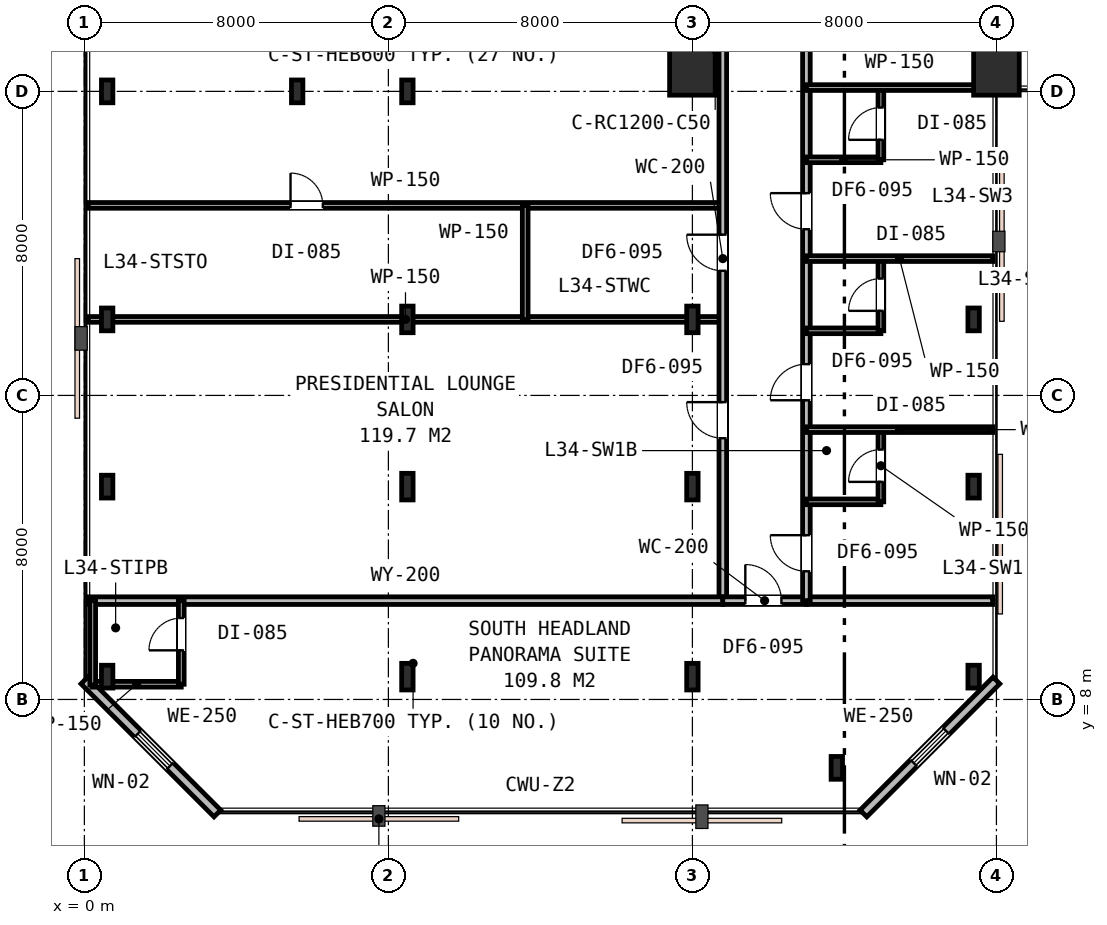
"""IFC4 building model, lengths in metres.
Left out: names, types, materials, properties, quantities, classifications, styles, units other than length and angle.
Written with IfcOpenShell. Run it as: python <this file> out.ifc"""

import sys

from ifc_helpers import new_model, si_unit, direction, frame, frame_2d, origin, origin_2d, place, context, subcontext, project, spatial, rectangle, i_section, extrude, element, fill, save


model = new_model("IFC4")
c1 = context("Model", 3, precision=1e-05, world=origin(), true_north=direction((0.0, 1.0)))
c2 = subcontext(c1, "Body", "Model", "MODEL_VIEW")
j1 = project(units=[si_unit("LENGTHUNIT", "METRE"), si_unit("PLANEANGLEUNIT", "RADIAN")], contexts=[c1])
p1 = place(None, origin())
s1 = spatial("IfcSite", under=j1, at=p1, CompositionType="ELEMENT")
p2 = place(p1, origin())
s2 = spatial("IfcBuilding", under=s1, at=p2, CompositionType="ELEMENT")
p3 = place(p2, frame((0.0, 0.0, 133.2)))
s3 = spatial("IfcBuildingStorey", under=s2, at=p3, CompositionType="ELEMENT", Elevation=133.2)
p4 = place(p3, frame((8.5, 24.0, 0.0), z_axis=(0.0, 0.0, 1.0), x_axis=(1.0, 0.0, 0.0)))
e1 = element("IfcColumn", 1, at=p4, inside=s3, PredefinedType="COLUMN", context=c2, shape_type="SweptSolid", body=[
    extrude(i_section(OverallWidth=0.3, OverallDepth=0.6, WebThickness=0.015, FlangeThickness=0.03, FilletRadius=0.027, at=origin_2d()), origin(), (0.0, 0.0, 1.0), 3.6),
])
for number, where, z_axis, x_axis in (
    (2, (16.0, 24.5, 0.0), (0.0, 0.0, 1.0), (1.0, 0.0, 0.0)),
    (3, (24.0, 24.5, 0.0), (0.0, 0.0, 1.0), (1.0, 0.0, 0.0)),
):
    element("IfcColumn", number, at=place(p3, frame(where, z_axis=z_axis, x_axis=x_axis)), inside=s3, PredefinedType="COLUMN", context=c2, shape_type="SweptSolid", body=[
        extrude(rectangle(XDim=1.2, YDim=1.2, at=origin_2d()), origin(), (0.0, 0.0, 1.0), 3.6),
    ])
for number, where, z_axis, x_axis in (
    (4, (5.6, 24.0, 0.0), (0.0, 0.0, 1.0), (1.0, 0.0, 0.0)),
    (5, (0.6, 24.0, 0.0), (0.0, 0.0, 1.0), (1.0, 0.0, 0.0)),
    (6, (0.6, 8.6, 0.0), (0.0, 0.0, 1.0), (1.0, 0.0, 0.0)),
    (7, (0.6, 13.6, 0.0), (0.0, 0.0, 1.0), (1.0, 0.0, 0.0)),
    (8, (0.6, 18.0, 0.0), (0.0, 0.0, 1.0), (1.0, 0.0, 0.0)),
    (9, (19.8, 6.2, 0.0), (0.0, 0.0, 1.0), (1.0, 0.0, 0.0)),
    (10, (23.4, 8.6, 0.0), (0.0, 0.0, 1.0), (1.0, 0.0, 0.0)),
    (11, (23.4, 13.6, 0.0), (0.0, 0.0, 1.0), (1.0, 0.0, 0.0)),
    (12, (23.4, 18.0, 0.0), (0.0, 0.0, 1.0), (1.0, 0.0, 0.0)),
):
    element("IfcColumn", number, at=place(p3, frame(where, z_axis=z_axis, x_axis=x_axis)), inside=s3, PredefinedType="COLUMN", context=c2, shape_type="SweptSolid", body=[
        extrude(i_section(OverallWidth=0.3, OverallDepth=0.6, WebThickness=0.015, FlangeThickness=0.03, FilletRadius=0.027, at=origin_2d()), origin(), (0.0, 0.0, 1.0), 3.6),
    ])
for number, where, z_axis, x_axis in (
    (13, (8.5, 8.6, 0.0), (0.0, 0.0, 1.0), (1.0, 0.0, 0.0)),
    (14, (16.0, 8.6, 0.0), (0.0, 0.0, 1.0), (1.0, 0.0, 0.0)),
    (15, (8.5, 13.6, 0.0), (0.0, 0.0, 1.0), (1.0, 0.0, 0.0)),
    (16, (16.0, 13.6, 0.0), (0.0, 0.0, 1.0), (1.0, 0.0, 0.0)),
    (17, (8.5, 18.0, 0.0), (0.0, 0.0, 1.0), (1.0, 0.0, 0.0)),
    (18, (16.0, 18.0, 0.0), (0.0, 0.0, 1.0), (1.0, 0.0, 0.0)),
):
    element("IfcColumn", number, at=place(p3, frame(where, z_axis=z_axis, x_axis=x_axis)), inside=s3, PredefinedType="COLUMN", context=c2, shape_type="SweptSolid", body=[
        extrude(i_section(OverallWidth=0.3, OverallDepth=0.7, WebThickness=0.017, FlangeThickness=0.032, FilletRadius=0.027, at=origin_2d()), origin(), (0.0, 0.0, 1.0), 3.6),
    ])
p5 = place(p3, frame((20.5, 5.0, 0.0), z_axis=(0.0, 0.0, 1.0), x_axis=(0.707106781187, 0.707106781187, 0.0)))
e19 = element("IfcWall", 19, at=p5, inside=s3, PredefinedType="STANDARD", context=c2, shape_type="SweptSolid", body=[
    extrude(rectangle(XDim=4.95, YDim=0.25, at=frame_2d((2.475, 0.0))), origin(), (0.0, 0.0, 1.0), 3.33),
])
p6 = place(p5, frame((1.875, 0.0, 0.85)))
e20 = element("IfcOpeningElement", 20, at=p6, cuts=e19, PredefinedType="OPENING", context=c2, shape_type="SweptSolid", body=[
    extrude(rectangle(XDim=1.2, YDim=1.6, at=frame_2d((0.6, 0.8))), frame((0.0, 0.135, 0.0), z_axis=(0.0, -1.0, 0.0), x_axis=(1.0, 0.0, 0.0)), (0.0, 0.0, 1.0), 0.27),
])
p7 = place(p3, frame((0.0, 8.5, 0.0), z_axis=(0.0, 0.0, 1.0), x_axis=(0.707106781187, -0.707106781187, 0.0)))
e21 = element("IfcWall", 21, at=p7, inside=s3, PredefinedType="STANDARD", context=c2, shape_type="SweptSolid", body=[
    extrude(rectangle(XDim=4.95, YDim=0.25, at=frame_2d((2.475, 0.0))), origin(), (0.0, 0.0, 1.0), 3.33),
])
p8 = place(p7, frame((1.985, 0.0, 0.85)))
e22 = element("IfcOpeningElement", 22, at=p8, cuts=e21, PredefinedType="OPENING", context=c2, shape_type="SweptSolid", body=[
    extrude(rectangle(XDim=1.2, YDim=1.6, at=frame_2d((0.6, 0.8))), frame((0.0, 0.135, 0.0), z_axis=(0.0, -1.0, 0.0), x_axis=(1.0, 0.0, 0.0)), (0.0, 0.0, 1.0), 0.27),
])
p9 = place(p3, frame((0.1, 18.0, 0.0), z_axis=(0.0, 0.0, 1.0), x_axis=(1.0, 0.0, 0.0)))
e23 = element("IfcWall", 23, at=p9, inside=s3, PredefinedType="PARTITIONING", context=c2, shape_type="SweptSolid", body=[
    extrude(rectangle(XDim=16.7, YDim=0.15, at=frame_2d((8.35, 0.0))), origin(), (0.0, 0.0, 1.0), 2.93),
])
p10 = place(p3, frame((0.1, 21.0, 0.0), z_axis=(0.0, 0.0, 1.0), x_axis=(1.0, 0.0, 0.0)))
e24 = element("IfcWall", 24, at=p10, inside=s3, PredefinedType="PARTITIONING", context=c2, shape_type="SweptSolid", body=[
    extrude(rectangle(XDim=16.7, YDim=0.15, at=frame_2d((8.35, 0.0))), origin(), (0.0, 0.0, 1.0), 2.93),
])
p11 = place(p10, frame((5.325, 0.0, 0.0)))
e25 = element("IfcOpeningElement", 25, at=p11, cuts=e24, PredefinedType="OPENING", context=c2, shape_type="SweptSolid", body=[
    extrude(rectangle(XDim=0.85, YDim=2.15, at=frame_2d((0.425, 1.075))), frame((0.0, 0.085, 0.0), z_axis=(0.0, -1.0, 0.0), x_axis=(1.0, 0.0, 0.0)), (0.0, 0.0, 1.0), 0.17),
])
p12 = place(p3, frame((11.6, 18.0, 0.0), z_axis=(0.0, 0.0, 1.0), x_axis=(0.0, 1.0, 0.0)))
e26 = element("IfcWall", 26, at=p12, inside=s3, PredefinedType="PARTITIONING", context=c2, shape_type="SweptSolid", body=[
    extrude(rectangle(XDim=3.0, YDim=0.15, at=frame_2d((1.5, 0.0))), origin(), (0.0, 0.0, 1.0), 2.93),
])
p13 = place(p3, frame((16.8, 10.6, 0.0), z_axis=(0.0, 0.0, 1.0), x_axis=(0.0, 1.0, 0.0)))
e27 = element("IfcWall", 27, at=p13, inside=s3, PredefinedType="PARTITIONING", context=c2, shape_type="SweptSolid", body=[
    extrude(rectangle(XDim=18.0, YDim=0.2, at=frame_2d((9.0, 0.0))), origin(), (0.0, 0.0, 1.0), 2.93),
])
p14 = place(p13, frame((8.679, 0.0, 0.0)))
e28 = element("IfcOpeningElement", 28, at=p14, cuts=e27, PredefinedType="OPENING", context=c2, shape_type="SweptSolid", body=[
    extrude(rectangle(XDim=0.95, YDim=2.15, at=frame_2d((0.475, 1.075))), frame((0.0, 0.11, 0.0), z_axis=(0.0, -1.0, 0.0), x_axis=(1.0, 0.0, 0.0)), (0.0, 0.0, 1.0), 0.22),
])
p15 = place(p13, frame((15.399, 0.0, 0.0)))
e29 = element("IfcOpeningElement", 29, at=p15, cuts=e27, PredefinedType="OPENING", context=c2, shape_type="SweptSolid", body=[
    extrude(rectangle(XDim=0.95, YDim=2.15, at=frame_2d((0.475, 1.075))), frame((0.0, 0.11, 0.0), z_axis=(0.0, -1.0, 0.0), x_axis=(1.0, 0.0, 0.0)), (0.0, 0.0, 1.0), 0.22),
])
p16 = place(p13, frame((4.273, 0.0, 0.0)))
e30 = element("IfcOpeningElement", 30, at=p16, cuts=e27, PredefinedType="OPENING", context=c2, shape_type="SweptSolid", body=[
    extrude(rectangle(XDim=0.95, YDim=2.15, at=frame_2d((0.475, 1.075))), frame((0.0, 0.11, 0.0), z_axis=(0.0, -1.0, 0.0), x_axis=(1.0, 0.0, 0.0)), (0.0, 0.0, 1.0), 0.22),
])
p17 = place(p3, frame((0.1, 10.6, 0.0), z_axis=(0.0, 0.0, 1.0), x_axis=(1.0, 0.0, 0.0)))
e31 = element("IfcWall", 31, at=p17, inside=s3, PredefinedType="PARTITIONING", context=c2, shape_type="SweptSolid", body=[
    extrude(rectangle(XDim=16.7, YDim=0.2, at=frame_2d((8.35, 0.0))), origin(), (0.0, 0.0, 1.0), 2.93),
])
p18 = place(p3, frame((19.0, 10.6, 0.0), z_axis=(0.0, 0.0, 1.0), x_axis=(1.0, 0.0, 0.0)))
e32 = element("IfcWall", 32, at=p18, inside=s3, PredefinedType="PARTITIONING", context=c2, shape_type="SweptSolid", body=[
    extrude(rectangle(XDim=4.9, YDim=0.2, at=frame_2d((2.45, 0.0))), origin(), (0.0, 0.0, 1.0), 2.96),
])
p19 = place(p3, frame((16.8, 10.6, 0.0), z_axis=(0.0, 0.0, 1.0), x_axis=(1.0, 0.0, 0.0)))
e33 = element("IfcWall", 33, at=p19, inside=s3, PredefinedType="PARTITIONING", context=c2, shape_type="SweptSolid", body=[
    extrude(rectangle(XDim=2.2, YDim=0.2, at=frame_2d((1.1, 0.0))), origin(), (0.0, 0.0, 1.0), 2.96),
])
p20 = place(p19, frame((0.593, 0.0, 0.0)))
e34 = element("IfcOpeningElement", 34, at=p20, cuts=e33, PredefinedType="OPENING", context=c2, shape_type="SweptSolid", body=[
    extrude(rectangle(XDim=0.95, YDim=2.15, at=frame_2d((0.475, 1.075))), frame((0.0, 0.11, 0.0), z_axis=(0.0, -1.0, 0.0), x_axis=(1.0, 0.0, 0.0)), (0.0, 0.0, 1.0), 0.22),
])
p21 = place(p3, frame((0.2, 8.4, 0.0), z_axis=(0.0, 0.0, 1.0), x_axis=(1.0, 0.0, 0.0)))
e35 = element("IfcWall", 35, at=p21, inside=s3, PredefinedType="PARTITIONING", context=c2, shape_type="SweptSolid", body=[
    extrude(rectangle(XDim=2.35, YDim=0.15, at=frame_2d((1.175, 0.0))), origin(), (0.0, 0.0, 1.0), 2.93),
])
p22 = place(p3, frame((2.55, 8.4, 0.0), z_axis=(0.0, 0.0, 1.0), x_axis=(0.0, 1.0, 0.0)))
e36 = element("IfcWall", 36, at=p22, inside=s3, PredefinedType="PARTITIONING", context=c2, shape_type="SweptSolid", body=[
    extrude(rectangle(XDim=2.2, YDim=0.15, at=frame_2d((1.1, 0.0))), origin(), (0.0, 0.0, 1.0), 2.93),
])
p23 = place(p22, frame((0.892, 0.0, 0.0)))
e37 = element("IfcOpeningElement", 37, at=p23, cuts=e36, PredefinedType="OPENING", context=c2, shape_type="SweptSolid", body=[
    extrude(rectangle(XDim=0.85, YDim=2.15, at=frame_2d((0.425, 1.075))), frame((0.0, 0.085, 0.0), z_axis=(0.0, -1.0, 0.0), x_axis=(1.0, 0.0, 0.0)), (0.0, 0.0, 1.0), 0.17),
])
p24 = place(p3, frame((0.22, 8.38, 0.0), z_axis=(0.0, 0.0, 1.0), x_axis=(0.0, 1.0, 0.0)))
e38 = element("IfcWall", 38, at=p24, inside=s3, PredefinedType="PARTITIONING", context=c2, shape_type="SweptSolid", body=[
    extrude(rectangle(XDim=2.22, YDim=0.15, at=frame_2d((1.11, 0.0))), origin(), (0.0, 0.0, 1.0), 2.93),
])
p25 = place(p3, frame((19.0, 10.6, 0.0), z_axis=(0.0, 0.0, 1.0), x_axis=(0.0, 1.0, 0.0)))
e39 = element("IfcWall", 39, at=p25, inside=s3, PredefinedType="PARTITIONING", context=c2, shape_type="SweptSolid", body=[
    extrude(rectangle(XDim=18.0, YDim=0.2, at=frame_2d((9.0, 0.0))), origin(), (0.0, 0.0, 1.0), 2.93),
])
p26 = place(p25, frame((0.772, 0.0, 0.0)))
e40 = element("IfcOpeningElement", 40, at=p26, cuts=e39, PredefinedType="OPENING", context=c2, shape_type="SweptSolid", body=[
    extrude(rectangle(XDim=0.95, YDim=2.15, at=frame_2d((0.475, 1.075))), frame((0.0, 0.11, 0.0), z_axis=(0.0, -1.0, 0.0), x_axis=(1.0, 0.0, 0.0)), (0.0, 0.0, 1.0), 0.22),
])
p27 = place(p25, frame((5.272, 0.0, 0.0)))
e41 = element("IfcOpeningElement", 41, at=p27, cuts=e39, PredefinedType="OPENING", context=c2, shape_type="SweptSolid", body=[
    extrude(rectangle(XDim=0.95, YDim=2.15, at=frame_2d((0.475, 1.075))), frame((0.0, 0.11, 0.0), z_axis=(0.0, -1.0, 0.0), x_axis=(1.0, 0.0, 0.0)), (0.0, 0.0, 1.0), 0.22),
])
p28 = place(p25, frame((9.773, 0.0, 0.0)))
e42 = element("IfcOpeningElement", 42, at=p28, cuts=e39, PredefinedType="OPENING", context=c2, shape_type="SweptSolid", body=[
    extrude(rectangle(XDim=0.95, YDim=2.15, at=frame_2d((0.475, 1.075))), frame((0.0, 0.11, 0.0), z_axis=(0.0, -1.0, 0.0), x_axis=(1.0, 0.0, 0.0)), (0.0, 0.0, 1.0), 0.22),
])
p29 = place(p25, frame((15.275, 0.0, 0.0)))
e43 = element("IfcOpeningElement", 43, at=p29, cuts=e39, PredefinedType="OPENING", context=c2, shape_type="SweptSolid", body=[
    extrude(rectangle(XDim=0.95, YDim=2.15, at=frame_2d((0.475, 1.075))), frame((0.0, 0.11, 0.0), z_axis=(0.0, -1.0, 0.0), x_axis=(1.0, 0.0, 0.0)), (0.0, 0.0, 1.0), 0.22),
])
p30 = place(p3, frame((19.0, 13.2, 0.0), z_axis=(0.0, 0.0, 1.0), x_axis=(1.0, 0.0, 0.0)))
e44 = element("IfcWall", 44, at=p30, inside=s3, PredefinedType="PARTITIONING", context=c2, shape_type="SweptSolid", body=[
    extrude(rectangle(XDim=1.96, YDim=0.15, at=frame_2d((0.98, 0.0))), origin(), (0.0, 0.0, 1.0), 2.93),
])
p31 = place(p3, frame((20.96, 13.2, 0.0), z_axis=(0.0, 0.0, 1.0), x_axis=(0.0, 1.0, 0.0)))
e45 = element("IfcWall", 45, at=p31, inside=s3, PredefinedType="PARTITIONING", context=c2, shape_type="SweptSolid", body=[
    extrude(rectangle(XDim=1.9, YDim=0.15, at=frame_2d((0.95, 0.0))), origin(), (0.0, 0.0, 1.0), 2.93),
])
p32 = place(p31, frame((0.525, 0.0, 0.0)))
e46 = element("IfcOpeningElement", 46, at=p32, cuts=e45, PredefinedType="OPENING", context=c2, shape_type="SweptSolid", body=[
    extrude(rectangle(XDim=0.85, YDim=2.15, at=frame_2d((0.425, 1.075))), frame((0.0, 0.085, 0.0), z_axis=(0.0, -1.0, 0.0), x_axis=(1.0, 0.0, 0.0)), (0.0, 0.0, 1.0), 0.17),
])
p33 = place(p3, frame((19.0, 15.1, 0.0), z_axis=(0.0, 0.0, 1.0), x_axis=(1.0, 0.0, 0.0)))
e47 = element("IfcWall", 47, at=p33, inside=s3, PredefinedType="PARTITIONING", context=c2, shape_type="SweptSolid", body=[
    extrude(rectangle(XDim=4.9, YDim=0.15, at=frame_2d((2.45, 0.0))), origin(), (0.0, 0.0, 1.0), 2.96),
])
p34 = place(p3, frame((19.0, 17.7, 0.0), z_axis=(0.0, 0.0, 1.0), x_axis=(1.0, 0.0, 0.0)))
e48 = element("IfcWall", 48, at=p34, inside=s3, PredefinedType="PARTITIONING", context=c2, shape_type="SweptSolid", body=[
    extrude(rectangle(XDim=1.96, YDim=0.15, at=frame_2d((0.98, 0.0))), origin(), (0.0, 0.0, 1.0), 2.93),
])
p35 = place(p3, frame((20.96, 17.7, 0.0), z_axis=(0.0, 0.0, 1.0), x_axis=(0.0, 1.0, 0.0)))
e49 = element("IfcWall", 49, at=p35, inside=s3, PredefinedType="PARTITIONING", context=c2, shape_type="SweptSolid", body=[
    extrude(rectangle(XDim=1.9, YDim=0.15, at=frame_2d((0.95, 0.0))), origin(), (0.0, 0.0, 1.0), 2.93),
])
p36 = place(p35, frame((0.525, 0.0, 0.0)))
e50 = element("IfcOpeningElement", 50, at=p36, cuts=e49, PredefinedType="OPENING", context=c2, shape_type="SweptSolid", body=[
    extrude(rectangle(XDim=0.85, YDim=2.15, at=frame_2d((0.425, 1.075))), frame((0.0, 0.085, 0.0), z_axis=(0.0, -1.0, 0.0), x_axis=(1.0, 0.0, 0.0)), (0.0, 0.0, 1.0), 0.17),
])
p37 = place(p3, frame((19.0, 19.6, 0.0), z_axis=(0.0, 0.0, 1.0), x_axis=(1.0, 0.0, 0.0)))
e51 = element("IfcWall", 51, at=p37, inside=s3, PredefinedType="PARTITIONING", context=c2, shape_type="SweptSolid", body=[
    extrude(rectangle(XDim=4.9, YDim=0.15, at=frame_2d((2.45, 0.0))), origin(), (0.0, 0.0, 1.0), 3.33),
])
p38 = place(p3, frame((19.0, 22.2, 0.0), z_axis=(0.0, 0.0, 1.0), x_axis=(1.0, 0.0, 0.0)))
e52 = element("IfcWall", 52, at=p38, inside=s3, PredefinedType="PARTITIONING", context=c2, shape_type="SweptSolid", body=[
    extrude(rectangle(XDim=1.96, YDim=0.15, at=frame_2d((0.98, 0.0))), origin(), (0.0, 0.0, 1.0), 3.33),
])
p39 = place(p3, frame((20.96, 22.2, 0.0), z_axis=(0.0, 0.0, 1.0), x_axis=(0.0, 1.0, 0.0)))
e53 = element("IfcWall", 53, at=p39, inside=s3, PredefinedType="PARTITIONING", context=c2, shape_type="SweptSolid", body=[
    extrude(rectangle(XDim=1.9, YDim=0.15, at=frame_2d((0.95, 0.0))), origin(), (0.0, 0.0, 1.0), 2.93),
])
p40 = place(p39, frame((0.525, 0.0, 0.0)))
e54 = element("IfcOpeningElement", 54, at=p40, cuts=e53, PredefinedType="OPENING", context=c2, shape_type="SweptSolid", body=[
    extrude(rectangle(XDim=0.85, YDim=2.15, at=frame_2d((0.425, 1.075))), frame((0.0, 0.085, 0.0), z_axis=(0.0, -1.0, 0.0), x_axis=(1.0, 0.0, 0.0)), (0.0, 0.0, 1.0), 0.17),
])
p41 = place(p3, frame((19.0, 24.1, 0.0), z_axis=(0.0, 0.0, 1.0), x_axis=(1.0, 0.0, 0.0)))
e55 = element("IfcWall", 55, at=p41, inside=s3, PredefinedType="PARTITIONING", context=c2, shape_type="SweptSolid", body=[
    extrude(rectangle(XDim=4.9, YDim=0.15, at=frame_2d((2.45, 0.0))), origin(), (0.0, 0.0, 1.0), 2.93),
])
p42 = place(p6, origin())
e56 = element("IfcWindow", 56, at=p42, inside=s3, PartitioningType="SINGLE_PANEL", PredefinedType="WINDOW", context=c2, shape_type="SweptSolid", body=[
    extrude(rectangle(XDim=1.2, YDim=1.6, at=frame_2d((0.6, 0.8))), frame((0.0, 0.03, 0.0), z_axis=(0.0, -1.0, 0.0), x_axis=(1.0, 0.0, 0.0)), (0.0, 0.0, 1.0), 0.06),
])
fill(e20, e56)
p43 = place(p8, origin())
e57 = element("IfcWindow", 57, at=p43, inside=s3, PartitioningType="SINGLE_PANEL", PredefinedType="WINDOW", context=c2, shape_type="SweptSolid", body=[
    extrude(rectangle(XDim=1.2, YDim=1.6, at=frame_2d((0.6, 0.8))), frame((0.0, 0.03, 0.0), z_axis=(0.0, -1.0, 0.0), x_axis=(1.0, 0.0, 0.0)), (0.0, 0.0, 1.0), 0.06),
])
fill(e22, e57)
p44 = place(p14, origin())
e58 = element("IfcDoor", 58, at=p44, inside=s3, OperationType="SINGLE_SWING_RIGHT", PredefinedType="DOOR", context=c2, shape_type="SweptSolid", body=[
    extrude(rectangle(XDim=0.95, YDim=2.15, at=frame_2d((0.475, 1.075))), frame((0.0, 0.025, 0.0), z_axis=(0.0, -1.0, 0.0), x_axis=(1.0, 0.0, 0.0)), (0.0, 0.0, 1.0), 0.05),
])
fill(e28, e58)
p45 = place(p11, origin())
e59 = element("IfcDoor", 59, at=p45, inside=s3, OperationType="SINGLE_SWING_LEFT", PredefinedType="DOOR", context=c2, shape_type="SweptSolid", body=[
    extrude(rectangle(XDim=0.85, YDim=2.15, at=frame_2d((0.425, 1.075))), frame((0.0, 0.025, 0.0), z_axis=(0.0, -1.0, 0.0), x_axis=(1.0, 0.0, 0.0)), (0.0, 0.0, 1.0), 0.05),
])
fill(e25, e59)
p46 = place(p16, origin())
e60 = element("IfcDoor", 60, at=p46, inside=s3, OperationType="SINGLE_SWING_RIGHT", PredefinedType="DOOR", context=c2, shape_type="SweptSolid", body=[
    extrude(rectangle(XDim=0.95, YDim=2.15, at=frame_2d((0.475, 1.075))), frame((0.0, 0.025, 0.0), z_axis=(0.0, -1.0, 0.0), x_axis=(1.0, 0.0, 0.0)), (0.0, 0.0, 1.0), 0.05),
])
fill(e30, e60)
p47 = place(p20, origin())
e61 = element("IfcDoor", 61, at=p47, inside=s3, OperationType="SINGLE_SWING_LEFT", PredefinedType="DOOR", context=c2, shape_type="SweptSolid", body=[
    extrude(rectangle(XDim=0.95, YDim=2.15, at=frame_2d((0.475, 1.075))), frame((0.0, 0.025, 0.0), z_axis=(0.0, -1.0, 0.0), x_axis=(1.0, 0.0, 0.0)), (0.0, 0.0, 1.0), 0.05),
])
fill(e34, e61)
p48 = place(p23, origin())
e62 = element("IfcDoor", 62, at=p48, inside=s3, OperationType="SINGLE_SWING_LEFT", PredefinedType="DOOR", context=c2, shape_type="SweptSolid", body=[
    extrude(rectangle(XDim=0.85, YDim=2.15, at=frame_2d((0.425, 1.075))), frame((0.0, 0.025, 0.0), z_axis=(0.0, -1.0, 0.0), x_axis=(1.0, 0.0, 0.0)), (0.0, 0.0, 1.0), 0.05),
])
fill(e37, e62)
p49 = place(p26, origin())
e63 = element("IfcDoor", 63, at=p49, inside=s3, OperationType="SINGLE_SWING_RIGHT", PredefinedType="DOOR", context=c2, shape_type="SweptSolid", body=[
    extrude(rectangle(XDim=0.95, YDim=2.15, at=frame_2d((0.475, 1.075))), frame((0.0, 0.025, 0.0), z_axis=(0.0, -1.0, 0.0), x_axis=(1.0, 0.0, 0.0)), (0.0, 0.0, 1.0), 0.05),
])
fill(e40, e63)
p50 = place(p32, origin())
e64 = element("IfcDoor", 64, at=p50, inside=s3, OperationType="SINGLE_SWING_LEFT", PredefinedType="DOOR", context=c2, shape_type="SweptSolid", body=[
    extrude(rectangle(XDim=0.85, YDim=2.15, at=frame_2d((0.425, 1.075))), frame((0.0, 0.025, 0.0), z_axis=(0.0, -1.0, 0.0), x_axis=(1.0, 0.0, 0.0)), (0.0, 0.0, 1.0), 0.05),
])
fill(e46, e64)
p51 = place(p27, origin())
e65 = element("IfcDoor", 65, at=p51, inside=s3, OperationType="SINGLE_SWING_LEFT", PredefinedType="DOOR", context=c2, shape_type="SweptSolid", body=[
    extrude(rectangle(XDim=0.95, YDim=2.15, at=frame_2d((0.475, 1.075))), frame((0.0, 0.025, 0.0), z_axis=(0.0, -1.0, 0.0), x_axis=(1.0, 0.0, 0.0)), (0.0, 0.0, 1.0), 0.05),
])
fill(e41, e65)
p52 = place(p36, origin())
e66 = element("IfcDoor", 66, at=p52, inside=s3, OperationType="SINGLE_SWING_LEFT", PredefinedType="DOOR", context=c2, shape_type="SweptSolid", body=[
    extrude(rectangle(XDim=0.85, YDim=2.15, at=frame_2d((0.425, 1.075))), frame((0.0, 0.025, 0.0), z_axis=(0.0, -1.0, 0.0), x_axis=(1.0, 0.0, 0.0)), (0.0, 0.0, 1.0), 0.05),
])
fill(e50, e66)
p53 = place(p28, origin())
e67 = element("IfcDoor", 67, at=p53, inside=s3, OperationType="SINGLE_SWING_RIGHT", PredefinedType="DOOR", context=c2, shape_type="SweptSolid", body=[
    extrude(rectangle(XDim=0.95, YDim=2.15, at=frame_2d((0.475, 1.075))), frame((0.0, 0.025, 0.0), z_axis=(0.0, -1.0, 0.0), x_axis=(1.0, 0.0, 0.0)), (0.0, 0.0, 1.0), 0.05),
])
fill(e42, e67)
p54 = place(p40, origin())
e68 = element("IfcDoor", 68, at=p54, inside=s3, OperationType="SINGLE_SWING_LEFT", PredefinedType="DOOR", context=c2, shape_type="SweptSolid", body=[
    extrude(rectangle(XDim=0.85, YDim=2.15, at=frame_2d((0.425, 1.075))), frame((0.0, 0.025, 0.0), z_axis=(0.0, -1.0, 0.0), x_axis=(1.0, 0.0, 0.0)), (0.0, 0.0, 1.0), 0.05),
])
fill(e54, e68)
save(model, sys.argv[1])
